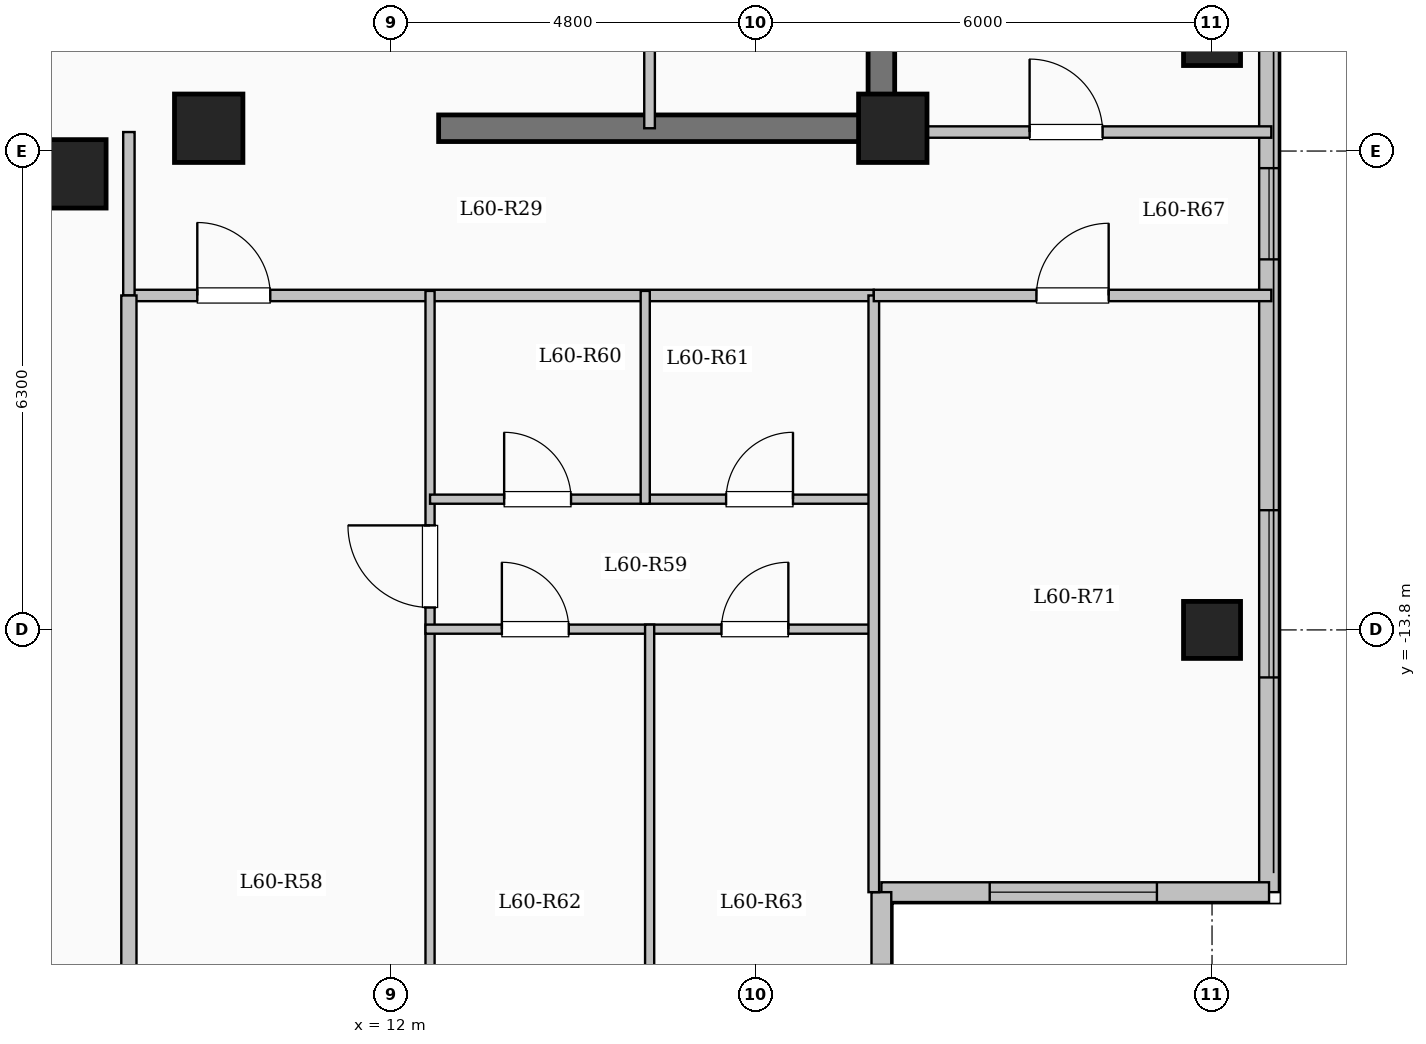
"""IFC4 building model, lengths in metres.
Left out: names, types, materials, properties, quantities, classifications, styles, units other than length and angle.
Written with IfcOpenShell. Run it as: python <this file> out.ifc"""

import sys

from ifc_helpers import new_model, si_unit, direction, frame, frame_2d, origin, origin_2d, place, context, subcontext, project, spatial, rectangle, extrude, element, fill, save


model = new_model("IFC4")
c1 = context("Model", 3, precision=1e-05, world=origin(), true_north=direction((0.0, 1.0)))
c2 = subcontext(c1, "Body", "Model", "MODEL_VIEW")
j1 = project(units=[si_unit("LENGTHUNIT", "METRE"), si_unit("PLANEANGLEUNIT", "RADIAN")], contexts=[c1])
p1 = place(None, origin())
s1 = spatial("IfcSite", under=j1, at=p1, CompositionType="ELEMENT")
p2 = place(p1, origin())
s2 = spatial("IfcBuilding", under=s1, at=p2, CompositionType="ELEMENT")
p3 = place(p2, frame((0.0, 0.0, 220.4)))
s3 = spatial("IfcBuildingStorey", under=s2, at=p3, CompositionType="ELEMENT", Elevation=220.4)
for number, where, z_axis, x_axis in (
    (1, (7.8, -7.8, 0.0), (0.0, 0.0, 1.0), (1.0, 0.0, 0.0)),
    (2, (9.6, -7.2, 0.0), (0.0, 0.0, 1.0), (1.0, 0.0, 0.0)),
    (3, (18.6, -7.2, 0.0), (0.0, 0.0, 1.0), (1.0, 0.0, 0.0)),
):
    element("IfcColumn", number, at=place(p3, frame(where, z_axis=z_axis, x_axis=x_axis)), inside=s3, PredefinedType="COLUMN", context=c2, shape_type="SweptSolid", body=[
        extrude(rectangle(XDim=0.9, YDim=0.9, at=origin_2d()), origin(), (0.0, 0.0, 1.0), 3.35),
    ])
for number, where, z_axis, x_axis in (
    (4, (22.8, -13.8, 0.0), (0.0, 0.0, 1.0), (1.0, 0.0, 0.0)),
    (5, (22.8, -6.0, 0.0), (0.0, 0.0, 1.0), (1.0, 0.0, 0.0)),
):
    element("IfcColumn", number, at=place(p3, frame(where, z_axis=z_axis, x_axis=x_axis)), inside=s3, PredefinedType="COLUMN", context=c2, shape_type="SweptSolid", body=[
        extrude(rectangle(XDim=0.75, YDim=0.75, at=origin_2d()), origin(), (0.0, 0.0, 1.0), 3.35),
    ])
p4 = place(p3, frame((23.55, 17.25, 0.0), z_axis=(0.0, 0.0, 1.0), x_axis=(0.0, -1.0, 0.0)))
e6 = element("IfcWall", 6, at=p4, inside=s3, PredefinedType="SOLIDWALL", context=c2, shape_type="SweptSolid", body=[
    extrude(rectangle(XDim=34.5, YDim=0.26, at=frame_2d((17.25, 0.0))), origin(), (0.0, 0.0, 1.0), 3.1),
])
p5 = place(p4, frame((1.375, 0.0, 0.9)))
e7 = element("IfcOpeningElement", 7, at=p5, cuts=e6, PredefinedType="OPENING", context=c2, shape_type="SweptSolid", body=[
    extrude(rectangle(XDim=2.0, YDim=1.7, at=frame_2d((1.0, 0.85))), frame((0.0, 0.14, 0.0), z_axis=(0.0, -1.0, 0.0), x_axis=(1.0, 0.0, 0.0)), (0.0, 0.0, 1.0), 0.28),
])
p6 = place(p4, frame((5.125, 0.0, 0.95)))
e8 = element("IfcOpeningElement", 8, at=p6, cuts=e6, PredefinedType="OPENING", context=c2, shape_type="SweptSolid", body=[
    extrude(rectangle(XDim=1.0, YDim=1.5, at=frame_2d((0.5, 0.75))), frame((0.0, 0.14, 0.0), z_axis=(0.0, -1.0, 0.0), x_axis=(1.0, 0.0, 0.0)), (0.0, 0.0, 1.0), 0.28),
])
p7 = place(p4, frame((8.375, 0.0, 0.9)))
e9 = element("IfcOpeningElement", 9, at=p7, cuts=e6, PredefinedType="OPENING", context=c2, shape_type="SweptSolid", body=[
    extrude(rectangle(XDim=2.0, YDim=1.7, at=frame_2d((1.0, 0.85))), frame((0.0, 0.14, 0.0), z_axis=(0.0, -1.0, 0.0), x_axis=(1.0, 0.0, 0.0)), (0.0, 0.0, 1.0), 0.28),
])
p8 = place(p4, frame((13.2, 0.0, 0.9)))
e10 = element("IfcOpeningElement", 10, at=p8, cuts=e6, PredefinedType="OPENING", context=c2, shape_type="SweptSolid", body=[
    extrude(rectangle(XDim=1.65, YDim=1.6, at=frame_2d((0.825, 0.8))), frame((0.0, 0.14, 0.0), z_axis=(0.0, -1.0, 0.0), x_axis=(1.0, 0.0, 0.0)), (0.0, 0.0, 1.0), 0.28),
])
p9 = place(p4, frame((19.05, 0.0, 0.9)))
e11 = element("IfcOpeningElement", 11, at=p9, cuts=e6, PredefinedType="OPENING", context=c2, shape_type="SweptSolid", body=[
    extrude(rectangle(XDim=2.2, YDim=1.75, at=frame_2d((1.1, 0.875))), frame((0.0, 0.14, 0.0), z_axis=(0.0, -1.0, 0.0), x_axis=(1.0, 0.0, 0.0)), (0.0, 0.0, 1.0), 0.28),
])
p10 = place(p4, frame((24.975, 0.0, 0.95)))
e12 = element("IfcOpeningElement", 12, at=p10, cuts=e6, PredefinedType="OPENING", context=c2, shape_type="SweptSolid", body=[
    extrude(rectangle(XDim=1.2, YDim=1.5, at=frame_2d((0.6, 0.75))), frame((0.0, 0.14, 0.0), z_axis=(0.0, -1.0, 0.0), x_axis=(1.0, 0.0, 0.0)), (0.0, 0.0, 1.0), 0.28),
])
p11 = place(p4, frame((29.475, 0.0, 0.9)))
e13 = element("IfcOpeningElement", 13, at=p11, cuts=e6, PredefinedType="OPENING", context=c2, shape_type="SweptSolid", body=[
    extrude(rectangle(XDim=2.2, YDim=1.75, at=frame_2d((1.1, 0.875))), frame((0.0, 0.14, 0.0), z_axis=(0.0, -1.0, 0.0), x_axis=(1.0, 0.0, 0.0)), (0.0, 0.0, 1.0), 0.28),
])
p12 = place(p3, frame((23.55, -17.25, 0.0), z_axis=(0.0, 0.0, 1.0), x_axis=(-1.0, 0.0, 0.0)))
e14 = element("IfcWall", 14, at=p12, inside=s3, PredefinedType="SOLIDWALL", context=c2, shape_type="SweptSolid", body=[
    extrude(rectangle(XDim=5.1, YDim=0.26, at=frame_2d((2.55, 0.0))), origin(), (0.0, 0.0, 1.0), 3.1),
])
p13 = place(p12, frame((1.475, 0.0, 0.9)))
e15 = element("IfcOpeningElement", 15, at=p13, cuts=e14, PredefinedType="OPENING", context=c2, shape_type="SweptSolid", body=[
    extrude(rectangle(XDim=2.2, YDim=1.75, at=frame_2d((1.1, 0.875))), frame((0.0, 0.14, 0.0), z_axis=(0.0, -1.0, 0.0), x_axis=(1.0, 0.0, 0.0)), (0.0, 0.0, 1.0), 0.28),
])
p14 = place(p3, frame((18.45, -17.25, 0.0), z_axis=(0.0, 0.0, 1.0), x_axis=(0.0, -1.0, 0.0)))
e16 = element("IfcWall", 16, at=p14, inside=s3, PredefinedType="SOLIDWALL", context=c2, shape_type="SweptSolid", body=[
    extrude(rectangle(XDim=3.6, YDim=0.26, at=frame_2d((1.8, 0.0))), origin(), (0.0, 0.0, 1.0), 3.1),
])
p15 = place(p14, frame((0.958, 0.0, 0.9)))
e17 = element("IfcOpeningElement", 17, at=p15, cuts=e16, PredefinedType="OPENING", context=c2, shape_type="SweptSolid", body=[
    extrude(rectangle(XDim=1.65, YDim=1.6, at=frame_2d((0.825, 0.8))), frame((0.0, 0.14, 0.0), z_axis=(0.0, -1.0, 0.0), x_axis=(1.0, 0.0, 0.0)), (0.0, 0.0, 1.0), 0.28),
])
p16 = place(p3, frame((18.45, -7.375, 0.0), z_axis=(0.0, 0.0, 1.0), x_axis=(0.0, 1.0, 0.0)))
e18 = element("IfcWall", 18, at=p16, inside=s3, PredefinedType="SHEAR", context=c2, shape_type="SweptSolid", body=[
    extrude(rectangle(XDim=14.05, YDim=0.35, at=frame_2d((7.025, 0.0))), origin(), (0.0, 0.0, 1.0), 3.35),
])
p17 = place(p3, frame((12.625, -7.2, 0.0), z_axis=(0.0, 0.0, 1.0), x_axis=(1.0, 0.0, 0.0)))
e19 = element("IfcWall", 19, at=p17, inside=s3, PredefinedType="SHEAR", context=c2, shape_type="SweptSolid", body=[
    extrude(rectangle(XDim=6.0, YDim=0.35, at=frame_2d((3.0, 0.0))), origin(), (0.0, 0.0, 1.0), 3.35),
])
p18 = place(p3, frame((15.4, -7.2, 0.0), z_axis=(0.0, 0.0, 1.0), x_axis=(0.0, 1.0, 0.0)))
e20 = element("IfcWall", 20, at=p18, inside=s3, PredefinedType="PARTITIONING", context=c2, shape_type="SweptSolid", body=[
    extrude(rectangle(XDim=10.45, YDim=0.14, at=frame_2d((5.225, 0.0))), origin(), (0.0, 0.0, 1.0), 3.1),
])
p19 = place(p18, frame((9.25, 0.0, 0.0)))
e21 = element("IfcOpeningElement", 21, at=p19, cuts=e20, PredefinedType="OPENING", context=c2, shape_type="SweptSolid", body=[
    extrude(rectangle(XDim=0.9, YDim=2.08, at=frame_2d((0.45, 1.04))), frame((0.0, 0.08, 0.0), z_axis=(0.0, -1.0, 0.0), x_axis=(1.0, 0.0, 0.0)), (0.0, 0.0, 1.0), 0.16),
])
p20 = place(p3, frame((8.55, -9.4, 0.0), z_axis=(0.0, 0.0, 1.0), x_axis=(1.0, 0.0, 0.0)))
e22 = element("IfcWall", 22, at=p20, inside=s3, PredefinedType="PARTITIONING", context=c2, shape_type="SweptSolid", body=[
    extrude(rectangle(XDim=9.8, YDim=0.15, at=frame_2d((4.9, 0.0))), origin(), (0.0, 0.0, 1.0), 3.1),
])
p21 = place(p20, frame((0.9, 0.0, 0.0)))
e23 = element("IfcOpeningElement", 23, at=p21, cuts=e22, PredefinedType="OPENING", context=c2, shape_type="SweptSolid", body=[
    extrude(rectangle(XDim=0.96, YDim=2.15, at=frame_2d((0.48, 1.075))), frame((0.0, 0.085, 0.0), z_axis=(0.0, -1.0, 0.0), x_axis=(1.0, 0.0, 0.0)), (0.0, 0.0, 1.0), 0.17),
])
p22 = place(p3, frame((8.55, -9.4, 0.0), z_axis=(0.0, 0.0, 1.0), x_axis=(0.0, 1.0, 0.0)))
e24 = element("IfcWall", 24, at=p22, inside=s3, PredefinedType="PARTITIONING", context=c2, shape_type="SweptSolid", body=[
    extrude(rectangle(XDim=2.15, YDim=0.15, at=frame_2d((1.075, 0.0))), origin(), (0.0, 0.0, 1.0), 3.1),
])
p23 = place(p3, frame((12.512, -20.9, 0.0), z_axis=(0.0, 0.0, 1.0), x_axis=(0.0, 1.0, 0.0)))
e25 = element("IfcWall", 25, at=p23, inside=s3, PredefinedType="PARTITIONING", context=c2, shape_type="SweptSolid", body=[
    extrude(rectangle(XDim=11.56, YDim=0.12, at=frame_2d((5.78, 0.0))), origin(), (0.0, 0.0, 1.0), 3.1),
])
p24 = place(p23, frame((7.395, 0.0, 0.0)))
e26 = element("IfcOpeningElement", 26, at=p24, cuts=e25, PredefinedType="OPENING", context=c2, shape_type="SweptSolid", body=[
    extrude(rectangle(XDim=1.08, YDim=2.15, at=frame_2d((0.54, 1.075))), frame((0.0, 0.07, 0.0), z_axis=(0.0, -1.0, 0.0), x_axis=(1.0, 0.0, 0.0)), (0.0, 0.0, 1.0), 0.14),
])
p25 = place(p3, frame((12.512, -12.08, 0.0), z_axis=(0.0, 0.0, 1.0), x_axis=(1.0, 0.0, 0.0)))
e27 = element("IfcWall", 27, at=p25, inside=s3, PredefinedType="PARTITIONING", context=c2, shape_type="SweptSolid", body=[
    extrude(rectangle(XDim=2.831, YDim=0.12, at=frame_2d((1.416, 0.0))), origin(), (0.0, 0.0, 1.0), 2.725),
])
p26 = place(p25, frame((0.975, 0.0, 0.0)))
e28 = element("IfcOpeningElement", 28, at=p26, cuts=e27, PredefinedType="OPENING", context=c2, shape_type="SweptSolid", body=[
    extrude(rectangle(XDim=0.88, YDim=2.1, at=frame_2d((0.44, 1.05))), frame((0.0, 0.07, 0.0), z_axis=(0.0, -1.0, 0.0), x_axis=(1.0, 0.0, 0.0)), (0.0, 0.0, 1.0), 0.14),
])
p27 = place(p3, frame((15.343, -12.08, 0.0), z_axis=(0.0, 0.0, 1.0), x_axis=(1.0, 0.0, 0.0)))
e29 = element("IfcWall", 29, at=p27, inside=s3, PredefinedType="PARTITIONING", context=c2, shape_type="SweptSolid", body=[
    extrude(rectangle(XDim=3.007, YDim=0.12, at=frame_2d((1.503, 0.0))), origin(), (0.0, 0.0, 1.0), 3.1),
])
p28 = place(p27, frame((1.064, 0.0, 0.0)))
e30 = element("IfcOpeningElement", 30, at=p28, cuts=e29, PredefinedType="OPENING", context=c2, shape_type="SweptSolid", body=[
    extrude(rectangle(XDim=0.88, YDim=2.1, at=frame_2d((0.44, 1.05))), frame((0.0, 0.07, 0.0), z_axis=(0.0, -1.0, 0.0), x_axis=(1.0, 0.0, 0.0)), (0.0, 0.0, 1.0), 0.14),
])
p29 = place(p3, frame((12.452, -13.79, 0.0), z_axis=(0.0, 0.0, 1.0), x_axis=(1.0, 0.0, 0.0)))
e31 = element("IfcWall", 31, at=p29, inside=s3, PredefinedType="PARTITIONING", context=c2, shape_type="SweptSolid", body=[
    extrude(rectangle(XDim=5.958, YDim=0.12, at=frame_2d((2.979, 0.0))), origin(), (0.0, 0.0, 1.0), 2.725),
])
p30 = place(p29, frame((1.005, 0.0, 0.0)))
e32 = element("IfcOpeningElement", 32, at=p30, cuts=e31, PredefinedType="OPENING", context=c2, shape_type="SweptSolid", body=[
    extrude(rectangle(XDim=0.88, YDim=2.1, at=frame_2d((0.44, 1.05))), frame((0.0, 0.07, 0.0), z_axis=(0.0, -1.0, 0.0), x_axis=(1.0, 0.0, 0.0)), (0.0, 0.0, 1.0), 0.14),
])
p31 = place(p29, frame((3.894, 0.0, 0.0)))
e33 = element("IfcOpeningElement", 33, at=p31, cuts=e31, PredefinedType="OPENING", context=c2, shape_type="SweptSolid", body=[
    extrude(rectangle(XDim=0.88, YDim=2.1, at=frame_2d((0.44, 1.05))), frame((0.0, 0.07, 0.0), z_axis=(0.0, -1.0, 0.0), x_axis=(1.0, 0.0, 0.0)), (0.0, 0.0, 1.0), 0.14),
])
p32 = place(p3, frame((15.343, -12.14, 0.0), z_axis=(0.0, 0.0, 1.0), x_axis=(0.0, 1.0, 0.0)))
e34 = element("IfcWall", 34, at=p32, inside=s3, PredefinedType="PARTITIONING", context=c2, shape_type="SweptSolid", body=[
    extrude(rectangle(XDim=2.8, YDim=0.12, at=frame_2d((1.4, 0.0))), origin(), (0.0, 0.0, 1.0), 3.1),
])
p33 = place(p3, frame((15.401, -20.9, 0.0), z_axis=(0.0, 0.0, 1.0), x_axis=(0.0, 1.0, 0.0)))
e35 = element("IfcWall", 35, at=p33, inside=s3, PredefinedType="PARTITIONING", context=c2, shape_type="SweptSolid", body=[
    extrude(rectangle(XDim=7.17, YDim=0.12, at=frame_2d((3.585, 0.0))), origin(), (0.0, 0.0, 1.0), 3.1),
])
p34 = place(p3, frame((8.55, -21.504, 0.0), z_axis=(0.0, 0.0, 1.0), x_axis=(0.0, 1.0, 0.0)))
e36 = element("IfcWall", 36, at=p34, inside=s3, PredefinedType="SOLIDWALL", context=c2, shape_type="SweptSolid", body=[
    extrude(rectangle(XDim=12.104, YDim=0.2, at=frame_2d((6.052, 0.0))), origin(), (0.0, 0.0, 1.0), 3.1),
])
p35 = place(p3, frame((18.45, -7.25, 0.0), z_axis=(0.0, 0.0, 1.0), x_axis=(1.0, 0.0, 0.0)))
e37 = element("IfcWall", 37, at=p35, inside=s3, PredefinedType="PARTITIONING", context=c2, shape_type="SweptSolid", body=[
    extrude(rectangle(XDim=5.13, YDim=0.15, at=frame_2d((2.565, 0.0))), origin(), (0.0, 0.0, 1.0), 3.1),
])
p36 = place(p35, frame((1.95, 0.0, 0.0)))
e38 = element("IfcOpeningElement", 38, at=p36, cuts=e37, PredefinedType="OPENING", context=c2, shape_type="SweptSolid", body=[
    extrude(rectangle(XDim=0.96, YDim=2.15, at=frame_2d((0.48, 1.075))), frame((0.0, 0.085, 0.0), z_axis=(0.0, -1.0, 0.0), x_axis=(1.0, 0.0, 0.0)), (0.0, 0.0, 1.0), 0.17),
])
p37 = place(p3, frame((18.35, -17.25, 0.0), z_axis=(0.0, 0.0, 1.0), x_axis=(0.0, 1.0, 0.0)))
e39 = element("IfcWall", 39, at=p37, inside=s3, PredefinedType="PARTITIONING", context=c2, shape_type="SweptSolid", body=[
    extrude(rectangle(XDim=7.85, YDim=0.14, at=frame_2d((3.925, 0.0))), origin(), (0.0, 0.0, 1.0), 3.1),
])
p38 = place(p3, frame((18.35, -9.4, 0.0), z_axis=(0.0, 0.0, 1.0), x_axis=(1.0, 0.0, 0.0)))
e40 = element("IfcWall", 40, at=p38, inside=s3, PredefinedType="PARTITIONING", context=c2, shape_type="SweptSolid", body=[
    extrude(rectangle(XDim=5.23, YDim=0.15, at=frame_2d((2.615, 0.0))), origin(), (0.0, 0.0, 1.0), 3.1),
])
p39 = place(p38, frame((2.14, 0.0, 0.0)))
e41 = element("IfcOpeningElement", 41, at=p39, cuts=e40, PredefinedType="OPENING", context=c2, shape_type="SweptSolid", body=[
    extrude(rectangle(XDim=0.95, YDim=2.15, at=frame_2d((0.475, 1.075))), frame((0.0, 0.085, 0.0), z_axis=(0.0, -1.0, 0.0), x_axis=(1.0, 0.0, 0.0)), (0.0, 0.0, 1.0), 0.17),
])
p40 = place(p10, origin())
e42 = element("IfcWindow", 42, at=p40, inside=s3, PartitioningType="SINGLE_PANEL", PredefinedType="WINDOW", context=c2, shape_type="SweptSolid", body=[
    extrude(rectangle(XDim=1.2, YDim=1.5, at=frame_2d((0.6, 0.75))), frame((0.0, 0.03, 0.0), z_axis=(0.0, -1.0, 0.0), x_axis=(1.0, 0.0, 0.0)), (0.0, 0.0, 1.0), 0.06),
])
fill(e12, e42)
p41 = place(p11, origin())
e43 = element("IfcWindow", 43, at=p41, inside=s3, PartitioningType="SINGLE_PANEL", PredefinedType="WINDOW", context=c2, shape_type="SweptSolid", body=[
    extrude(rectangle(XDim=2.2, YDim=1.75, at=frame_2d((1.1, 0.875))), frame((0.0, 0.03, 0.0), z_axis=(0.0, -1.0, 0.0), x_axis=(1.0, 0.0, 0.0)), (0.0, 0.0, 1.0), 0.06),
])
fill(e13, e43)
p42 = place(p13, origin())
e44 = element("IfcWindow", 44, at=p42, inside=s3, PartitioningType="SINGLE_PANEL", PredefinedType="WINDOW", context=c2, shape_type="SweptSolid", body=[
    extrude(rectangle(XDim=2.2, YDim=1.75, at=frame_2d((1.1, 0.875))), frame((0.0, 0.03, 0.0), z_axis=(0.0, -1.0, 0.0), x_axis=(1.0, 0.0, 0.0)), (0.0, 0.0, 1.0), 0.06),
])
fill(e15, e44)
p43 = place(p21, origin())
e45 = element("IfcDoor", 45, at=p43, inside=s3, OperationType="SINGLE_SWING_LEFT", PredefinedType="DOOR", context=c2, shape_type="SweptSolid", body=[
    extrude(rectangle(XDim=0.96, YDim=2.15, at=frame_2d((0.48, 1.075))), frame((0.0, 0.025, 0.0), z_axis=(0.0, -1.0, 0.0), x_axis=(1.0, 0.0, 0.0)), (0.0, 0.0, 1.0), 0.05),
])
fill(e23, e45)
p44 = place(p24, origin())
e46 = element("IfcDoor", 46, at=p44, inside=s3, OperationType="SINGLE_SWING_RIGHT", PredefinedType="DOOR", context=c2, shape_type="SweptSolid", body=[
    extrude(rectangle(XDim=1.08, YDim=2.15, at=frame_2d((0.54, 1.075))), frame((0.0, 0.025, 0.0), z_axis=(0.0, -1.0, 0.0), x_axis=(1.0, 0.0, 0.0)), (0.0, 0.0, 1.0), 0.05),
])
fill(e26, e46)
p45 = place(p26, origin())
e47 = element("IfcDoor", 47, at=p45, inside=s3, OperationType="SINGLE_SWING_LEFT", PredefinedType="DOOR", context=c2, shape_type="SweptSolid", body=[
    extrude(rectangle(XDim=0.88, YDim=2.1, at=frame_2d((0.44, 1.05))), frame((0.0, 0.025, 0.0), z_axis=(0.0, -1.0, 0.0), x_axis=(1.0, 0.0, 0.0)), (0.0, 0.0, 1.0), 0.05),
])
fill(e28, e47)
p46 = place(p28, origin())
e48 = element("IfcDoor", 48, at=p46, inside=s3, OperationType="SINGLE_SWING_RIGHT", PredefinedType="DOOR", context=c2, shape_type="SweptSolid", body=[
    extrude(rectangle(XDim=0.88, YDim=2.1, at=frame_2d((0.44, 1.05))), frame((0.0, 0.025, 0.0), z_axis=(0.0, -1.0, 0.0), x_axis=(1.0, 0.0, 0.0)), (0.0, 0.0, 1.0), 0.05),
])
fill(e30, e48)
p47 = place(p30, origin())
e49 = element("IfcDoor", 49, at=p47, inside=s3, OperationType="SINGLE_SWING_LEFT", PredefinedType="DOOR", context=c2, shape_type="SweptSolid", body=[
    extrude(rectangle(XDim=0.88, YDim=2.1, at=frame_2d((0.44, 1.05))), frame((0.0, 0.025, 0.0), z_axis=(0.0, -1.0, 0.0), x_axis=(1.0, 0.0, 0.0)), (0.0, 0.0, 1.0), 0.05),
])
fill(e32, e49)
p48 = place(p31, origin())
e50 = element("IfcDoor", 50, at=p48, inside=s3, OperationType="SINGLE_SWING_RIGHT", PredefinedType="DOOR", context=c2, shape_type="SweptSolid", body=[
    extrude(rectangle(XDim=0.88, YDim=2.1, at=frame_2d((0.44, 1.05))), frame((0.0, 0.025, 0.0), z_axis=(0.0, -1.0, 0.0), x_axis=(1.0, 0.0, 0.0)), (0.0, 0.0, 1.0), 0.05),
])
fill(e33, e50)
p49 = place(p39, origin())
e51 = element("IfcDoor", 51, at=p49, inside=s3, OperationType="SINGLE_SWING_RIGHT", PredefinedType="DOOR", context=c2, shape_type="SweptSolid", body=[
    extrude(rectangle(XDim=0.95, YDim=2.15, at=frame_2d((0.475, 1.075))), frame((0.0, 0.025, 0.0), z_axis=(0.0, -1.0, 0.0), x_axis=(1.0, 0.0, 0.0)), (0.0, 0.0, 1.0), 0.05),
])
fill(e41, e51)
p50 = place(p36, origin())
e52 = element("IfcDoor", 52, at=p50, inside=s3, OperationType="SINGLE_SWING_LEFT", PredefinedType="DOOR", context=c2, shape_type="SweptSolid", body=[
    extrude(rectangle(XDim=0.96, YDim=2.15, at=frame_2d((0.48, 1.075))), frame((0.0, 0.025, 0.0), z_axis=(0.0, -1.0, 0.0), x_axis=(1.0, 0.0, 0.0)), (0.0, 0.0, 1.0), 0.05),
])
fill(e38, e52)
save(model, sys.argv[1])
